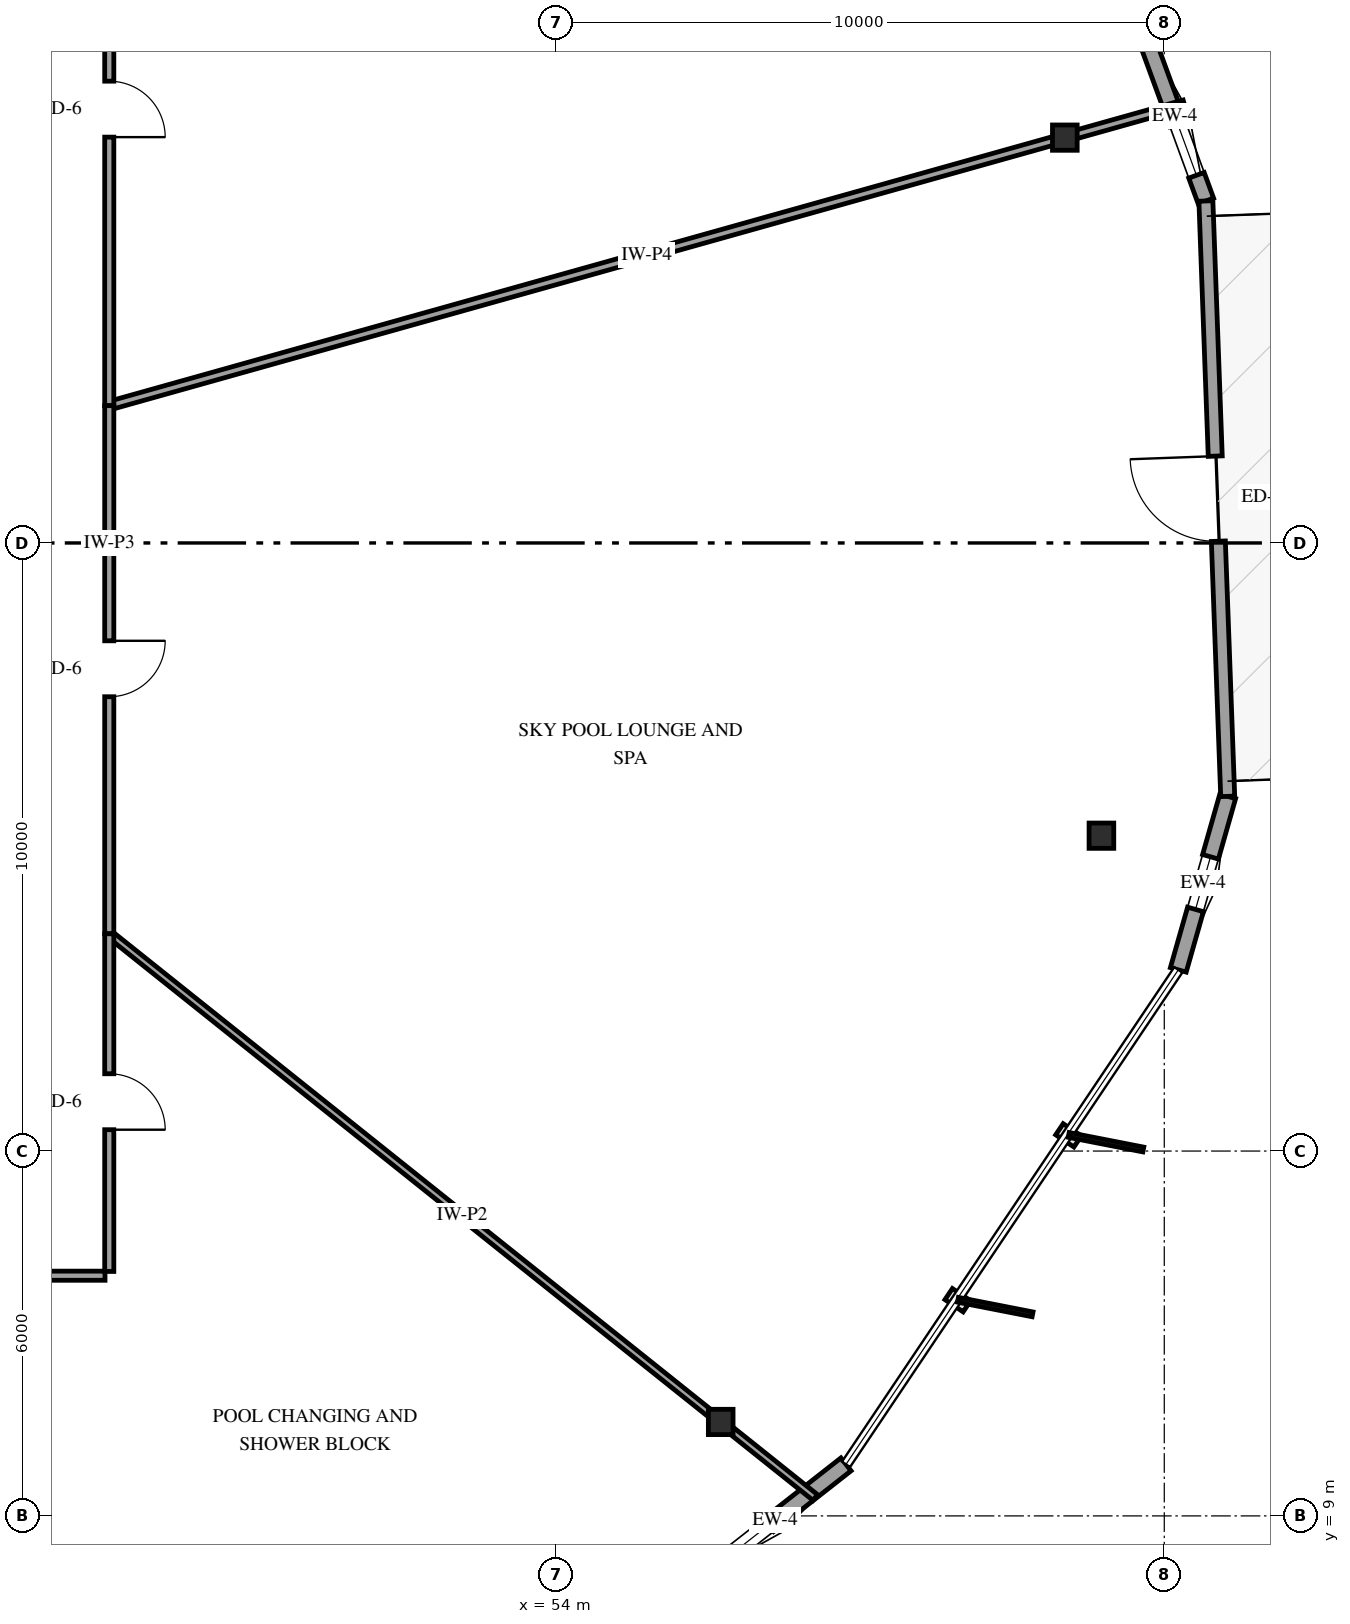
"""IFC4 building model, lengths in metres.
Left out: names, types, materials, properties, quantities, classifications, styles, units other than length and angle.
Written with IfcOpenShell. Run it as: python <this file> out.ifc"""

import sys

from ifc_helpers import new_model, si_unit, direction, frame, frame_2d, origin, origin_2d, place, context, subcontext, project, spatial, rectangle, i_section, extrude, element, fill, save


model = new_model("IFC4")
c1 = context("Model", 3, precision=1e-05, world=origin(), true_north=direction((0.0, 1.0)))
c2 = subcontext(c1, "Body", "Model", "MODEL_VIEW")
j1 = project(units=[si_unit("LENGTHUNIT", "METRE"), si_unit("PLANEANGLEUNIT", "RADIAN")], contexts=[c1])
p1 = place(None, origin())
s1 = spatial("IfcSite", under=j1, at=p1, CompositionType="ELEMENT")
p2 = place(p1, origin())
s2 = spatial("IfcBuilding", under=s1, at=p2, CompositionType="ELEMENT")
p3 = place(p2, frame((0.0, 0.0, 237.4)))
s3 = spatial("IfcBuildingStorey", under=s2, at=p3, CompositionType="ELEMENT", Elevation=237.4)
for number, where, z_axis, x_axis in (
    (1, (62.365, 31.666, 0.0), (0.0, 0.0, 1.0), (1.0, 0.0, 0.0)),
    (2, (56.705, 10.545, 0.0), (0.0, 0.0, 1.0), (1.0, 0.0, 0.0)),
    (3, (62.966, 20.186, 0.0), (0.0, 0.0, 1.0), (1.0, 0.0, 0.0)),
):
    element("IfcColumn", number, at=place(p3, frame(where, z_axis=z_axis, x_axis=x_axis)), inside=s3, PredefinedType="COLUMN", context=c2, shape_type="SweptSolid", body=[
        extrude(i_section(OverallWidth=0.406, OverallDepth=0.416, WebThickness=0.03, FlangeThickness=0.048, FilletRadius=0.038, at=origin_2d()), origin(), (0.0, 0.0, 1.0), 4.8),
    ])
p4 = place(p3, frame((56.431, 8.017, 0.0), z_axis=(0.0, 0.0, 1.0), x_axis=(0.78691766732, 0.617058007694, 0.0)))
e4 = element("IfcWall", 4, at=p4, inside=s3, PredefinedType="SOLIDWALL", context=c2, shape_type="SweptSolid", body=[
    extrude(rectangle(XDim=2.967, YDim=0.27, at=frame_2d((1.483, 0.0))), origin(), (0.0, 0.0, 1.0), 4.179),
])
p5 = place(p4, frame((0.45, 0.0, 0.75)))
e5 = element("IfcOpeningElement", 5, at=p5, cuts=e4, PredefinedType="OPENING", context=c2, shape_type="SweptSolid", body=[
    extrude(rectangle(XDim=0.9, YDim=1.5, at=frame_2d((0.45, 0.75))), frame((0.0, 0.145, 0.0), z_axis=(0.0, -1.0, 0.0), x_axis=(1.0, 0.0, 0.0)), (0.0, 0.0, 1.0), 0.29),
])
p6 = place(p3, frame((64.23, 17.98, 0.0), z_axis=(0.0, 0.0, 1.0), x_axis=(0.27397104283, 0.961737941276, 0.0)))
e6 = element("IfcWall", 6, at=p6, inside=s3, PredefinedType="SOLIDWALL", context=c2, shape_type="SweptSolid", body=[
    extrude(rectangle(XDim=2.967, YDim=0.27, at=frame_2d((1.483, 0.0))), origin(), (0.0, 0.0, 1.0), 4.179),
])
p7 = place(p6, frame((1.033, 0.0, 0.75)))
e7 = element("IfcOpeningElement", 7, at=p7, cuts=e6, PredefinedType="OPENING", context=c2, shape_type="SweptSolid", body=[
    extrude(rectangle(XDim=0.9, YDim=1.5, at=frame_2d((0.45, 0.75))), frame((0.0, 0.145, 0.0), z_axis=(0.0, -1.0, 0.0), x_axis=(1.0, 0.0, 0.0)), (0.0, 0.0, 1.0), 0.29),
])
p8 = place(p3, frame((64.684, 30.624, 0.0), z_axis=(0.0, 0.0, 1.0), x_axis=(-0.343572680233, 0.939126090255, 0.0)))
e8 = element("IfcWall", 8, at=p8, inside=s3, PredefinedType="SOLIDWALL", context=c2, shape_type="SweptSolid", body=[
    extrude(rectangle(XDim=2.967, YDim=0.27, at=frame_2d((1.483, 0.0))), origin(), (0.0, 0.0, 1.0), 4.179),
])
p9 = place(p8, frame((0.45, 0.0, 0.75)))
e9 = element("IfcOpeningElement", 9, at=p9, cuts=e8, PredefinedType="OPENING", context=c2, shape_type="SweptSolid", body=[
    extrude(rectangle(XDim=0.9, YDim=1.5, at=frame_2d((0.45, 0.75))), frame((0.0, 0.145, 0.0), z_axis=(0.0, -1.0, 0.0), x_axis=(1.0, 0.0, 0.0)), (0.0, 0.0, 1.0), 0.29),
])
p10 = place(p3, frame((65.043, 20.833, 0.0), z_axis=(0.0, 0.0, 1.0), x_axis=(-0.036654983518, 0.999327980286, 0.0)))
e10 = element("IfcWall", 10, at=p10, inside=s3, PredefinedType="SOLIDWALL", context=c2, shape_type="SweptSolid", body=[
    extrude(rectangle(XDim=9.798, YDim=0.23, at=frame_2d((4.899, 0.0))), origin(), (0.0, 0.0, 1.0), 4.179),
])
p11 = place(p10, frame((4.199, 0.0, 0.0)))
e11 = element("IfcOpeningElement", 11, at=p11, cuts=e10, PredefinedType="OPENING", context=c2, shape_type="SweptSolid", body=[
    extrude(rectangle(XDim=1.4, YDim=2.2, at=frame_2d((0.7, 1.1))), frame((0.0, 0.125, 0.0), z_axis=(0.0, -1.0, 0.0), x_axis=(1.0, 0.0, 0.0)), (0.0, 0.0, 1.0), 0.25),
])
p12 = place(p3, frame((64.329, 32.217, 0.0), z_axis=(0.0, 0.0, 1.0), x_axis=(-0.962839357713, -0.270074751206, 0.0)))
e12 = element("IfcWall", 12, at=p12, inside=s3, PredefinedType="PARTITIONING", context=c2, shape_type="SweptSolid", body=[
    extrude(rectangle(XDim=18.362, YDim=0.14, at=frame_2d((9.181, 0.0))), origin(), (0.0, 0.0, 1.0), 2.87),
])
p13 = place(p3, frame((46.65, 18.573, 0.0), z_axis=(0.0, 0.0, 1.0), x_axis=(0.781461641281, -0.623953286078, 0.0)))
e13 = element("IfcWall", 13, at=p13, inside=s3, PredefinedType="PARTITIONING", context=c2, shape_type="SweptSolid", body=[
    extrude(rectangle(XDim=14.857, YDim=0.12, at=frame_2d((7.428, 0.0))), origin(), (0.0, 0.0, 1.0), 3.09),
])
p14 = place(p3, frame((46.65, 36.98, 0.0), z_axis=(0.0, 0.0, 1.0), x_axis=(0.0, -1.0, 0.0)))
e14 = element("IfcWall", 14, at=p14, inside=s3, PredefinedType="PARTITIONING", context=c2, shape_type="SweptSolid", body=[
    extrude(rectangle(XDim=9.722, YDim=0.15, at=frame_2d((4.861, 0.0))), origin(), (0.0, 0.0, 1.0), 4.8),
])
p15 = place(p14, frame((4.386, 0.0, 0.0)))
e15 = element("IfcOpeningElement", 15, at=p15, cuts=e14, PredefinedType="OPENING", context=c2, shape_type="SweptSolid", body=[
    extrude(rectangle(XDim=0.92, YDim=2.12, at=frame_2d((0.46, 1.06))), frame((0.0, 0.085, 0.0), z_axis=(0.0, -1.0, 0.0), x_axis=(1.0, 0.0, 0.0)), (0.0, 0.0, 1.0), 0.17),
])
p16 = place(p3, frame((43.383, 12.95, 0.0), z_axis=(0.0, 0.0, 1.0), x_axis=(0.368967753702, -0.92944219655, 0.0)))
e16 = element("IfcWall", 16, at=p16, inside=s3, PredefinedType="PARTITIONING", context=c2, shape_type="SweptSolid", body=[
    extrude(rectangle(XDim=9.039, YDim=0.14, at=frame_2d((4.519, 0.0))), origin(), (0.0, 0.0, 1.0), 3.09),
])
p17 = place(p3, frame((46.65, 27.258, 0.0), z_axis=(0.0, 0.0, 1.0), x_axis=(0.0, -1.0, 0.0)))
e17 = element("IfcWall", 17, at=p17, inside=s3, PredefinedType="PARTITIONING", context=c2, shape_type="SweptSolid", body=[
    extrude(rectangle(XDim=8.685, YDim=0.15, at=frame_2d((4.343, 0.0))), origin(), (0.0, 0.0, 1.0), 4.8),
])
p18 = place(p17, frame((3.867, 0.0, 0.0)))
e18 = element("IfcOpeningElement", 18, at=p18, cuts=e17, PredefinedType="OPENING", context=c2, shape_type="SweptSolid", body=[
    extrude(rectangle(XDim=0.92, YDim=2.12, at=frame_2d((0.46, 1.06))), frame((0.0, 0.085, 0.0), z_axis=(0.0, -1.0, 0.0), x_axis=(1.0, 0.0, 0.0)), (0.0, 0.0, 1.0), 0.17),
])
p19 = place(p3, frame((46.65, 18.573, 0.0), z_axis=(0.0, 0.0, 1.0), x_axis=(0.0, -1.0, 0.0)))
e19 = element("IfcWall", 19, at=p19, inside=s3, PredefinedType="PARTITIONING", context=c2, shape_type="SweptSolid", body=[
    extrude(rectangle(XDim=5.553, YDim=0.15, at=frame_2d((2.776, 0.0))), origin(), (0.0, 0.0, 1.0), 4.8),
])
p20 = place(p19, frame((2.302, 0.0, 0.0)))
e20 = element("IfcOpeningElement", 20, at=p20, cuts=e19, PredefinedType="OPENING", context=c2, shape_type="SweptSolid", body=[
    extrude(rectangle(XDim=0.92, YDim=2.12, at=frame_2d((0.46, 1.06))), frame((0.0, 0.085, 0.0), z_axis=(0.0, -1.0, 0.0), x_axis=(1.0, 0.0, 0.0)), (0.0, 0.0, 1.0), 0.17),
])
p21 = place(p3, frame((46.58, 12.95, 0.0), z_axis=(0.0, 0.0, 1.0), x_axis=(-1.0, 0.0, 0.0)))
e21 = element("IfcWall", 21, at=p21, inside=s3, PredefinedType="PARTITIONING", context=c2, shape_type="SweptSolid", body=[
    extrude(rectangle(XDim=3.197, YDim=0.15, at=frame_2d((1.599, 0.0))), origin(), (0.0, 0.0, 1.0), 4.8),
])
p22 = place(p5, origin())
e22 = element("IfcWindow", 22, at=p22, inside=s3, PartitioningType="SINGLE_PANEL", PredefinedType="WINDOW", context=c2, shape_type="SweptSolid", body=[
    extrude(rectangle(XDim=0.9, YDim=1.5, at=frame_2d((0.45, 0.75))), frame((0.0, 0.03, 0.0), z_axis=(0.0, -1.0, 0.0), x_axis=(1.0, 0.0, 0.0)), (0.0, 0.0, 1.0), 0.06),
])
fill(e5, e22)
p23 = place(p7, origin())
e23 = element("IfcWindow", 23, at=p23, inside=s3, PartitioningType="SINGLE_PANEL", PredefinedType="WINDOW", context=c2, shape_type="SweptSolid", body=[
    extrude(rectangle(XDim=0.9, YDim=1.5, at=frame_2d((0.45, 0.75))), frame((0.0, 0.03, 0.0), z_axis=(0.0, -1.0, 0.0), x_axis=(1.0, 0.0, 0.0)), (0.0, 0.0, 1.0), 0.06),
])
fill(e7, e23)
p24 = place(p9, origin())
e24 = element("IfcWindow", 24, at=p24, inside=s3, PartitioningType="SINGLE_PANEL", PredefinedType="WINDOW", context=c2, shape_type="SweptSolid", body=[
    extrude(rectangle(XDim=0.9, YDim=1.5, at=frame_2d((0.45, 0.75))), frame((0.0, 0.03, 0.0), z_axis=(0.0, -1.0, 0.0), x_axis=(1.0, 0.0, 0.0)), (0.0, 0.0, 1.0), 0.06),
])
fill(e9, e24)
p25 = place(p11, origin())
e25 = element("IfcDoor", 25, at=p25, inside=s3, OperationType="SINGLE_SWING_RIGHT", PredefinedType="DOOR", context=c2, shape_type="SweptSolid", body=[
    extrude(rectangle(XDim=1.4, YDim=2.2, at=frame_2d((0.7, 1.1))), frame((0.0, 0.025, 0.0), z_axis=(0.0, -1.0, 0.0), x_axis=(1.0, 0.0, 0.0)), (0.0, 0.0, 1.0), 0.05),
])
fill(e11, e25)
p26 = place(p15, origin())
e26 = element("IfcDoor", 26, at=p26, inside=s3, OperationType="SINGLE_SWING_RIGHT", PredefinedType="DOOR", context=c2, shape_type="SweptSolid", body=[
    extrude(rectangle(XDim=0.92, YDim=2.12, at=frame_2d((0.46, 1.06))), frame((0.0, 0.025, 0.0), z_axis=(0.0, -1.0, 0.0), x_axis=(1.0, 0.0, 0.0)), (0.0, 0.0, 1.0), 0.05),
])
fill(e15, e26)
p27 = place(p18, origin())
e27 = element("IfcDoor", 27, at=p27, inside=s3, OperationType="SINGLE_SWING_LEFT", PredefinedType="DOOR", context=c2, shape_type="SweptSolid", body=[
    extrude(rectangle(XDim=0.92, YDim=2.12, at=frame_2d((0.46, 1.06))), frame((0.0, 0.025, 0.0), z_axis=(0.0, -1.0, 0.0), x_axis=(1.0, 0.0, 0.0)), (0.0, 0.0, 1.0), 0.05),
])
fill(e18, e27)
p28 = place(p20, origin())
e28 = element("IfcDoor", 28, at=p28, inside=s3, OperationType="SINGLE_SWING_RIGHT", PredefinedType="DOOR", context=c2, shape_type="SweptSolid", body=[
    extrude(rectangle(XDim=0.92, YDim=2.12, at=frame_2d((0.46, 1.06))), frame((0.0, 0.025, 0.0), z_axis=(0.0, -1.0, 0.0), x_axis=(1.0, 0.0, 0.0)), (0.0, 0.0, 1.0), 0.05),
])
fill(e20, e28)
save(model, sys.argv[1])
